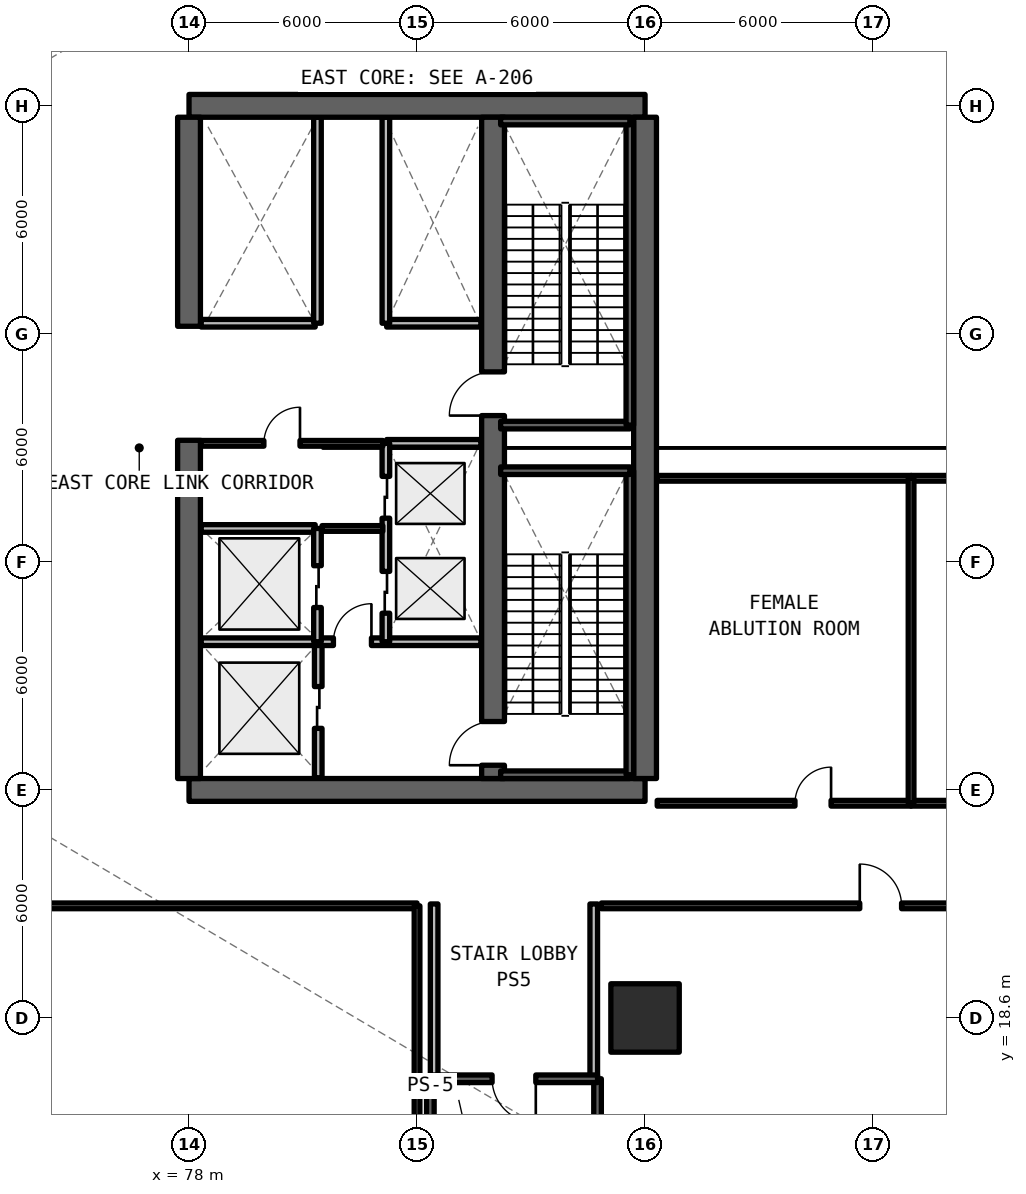
"""IFC4 building model, lengths in metres.
Left out: names, types, materials, properties, quantities, classifications, styles, units other than length and angle.
Written with IfcOpenShell. Run it as: python <this file> out.ifc"""

import sys

from ifc_helpers import new_model, si_unit, direction, frame, frame_2d, origin, origin_2d, place, context, subcontext, project, spatial, rectangle, extrude, element, fill, save


model = new_model("IFC4")
c1 = context("Model", 3, precision=1e-05, world=origin(), true_north=direction((0.0, 1.0)))
c2 = subcontext(c1, "Body", "Model", "MODEL_VIEW")
j1 = project(units=[si_unit("LENGTHUNIT", "METRE"), si_unit("PLANEANGLEUNIT", "RADIAN")], contexts=[c1])
p1 = place(None, origin())
s1 = spatial("IfcSite", under=j1, at=p1, CompositionType="ELEMENT")
p2 = place(p1, origin())
s2 = spatial("IfcBuilding", under=s1, at=p2, CompositionType="ELEMENT")
p3 = place(p2, frame((0.0, 0.0, 4.95)))
s3 = spatial("IfcBuildingStorey", under=s2, at=p3, CompositionType="ELEMENT", Elevation=4.95)
for number, where, z_axis, x_axis in (
    (1, (78.0, 24.6, 0.0), (0.0, 0.0, 1.0), (1.0, 0.0, 0.0)),
    (2, (90.0, 42.6, 0.0), (0.0, 0.0, 1.0), (-1.0, 0.0, 0.0)),
):
    element("IfcWall", number, at=place(p3, frame(where, z_axis=z_axis, x_axis=x_axis)), inside=s3, PredefinedType="SHEAR", context=c2, shape_type="SweptSolid", body=[
        extrude(rectangle(XDim=12.0, YDim=0.6, at=frame_2d((6.0, 0.0))), origin(), (0.0, 0.0, 1.0), 4.95),
    ])
p4 = place(p3, frame((90.0, 24.9, 0.0), z_axis=(0.0, 0.0, 1.0), x_axis=(0.0, 1.0, 0.0)))
e3 = element("IfcWall", 3, at=p4, inside=s3, PredefinedType="SHEAR", context=c2, shape_type="SweptSolid", body=[
    extrude(rectangle(XDim=17.4, YDim=0.6, at=frame_2d((8.7, 0.0))), origin(), (0.0, 0.0, 1.0), 4.95),
])
p5 = place(p3, frame((78.0, 24.9, 0.0), z_axis=(0.0, 0.0, 1.0), x_axis=(0.0, 1.0, 0.0)))
e4 = element("IfcWall", 4, at=p5, inside=s3, PredefinedType="SHEAR", context=c2, shape_type="SweptSolid", body=[
    extrude(rectangle(XDim=8.9, YDim=0.6, at=frame_2d((4.45, 0.0))), origin(), (0.0, 0.0, 1.0), 4.95),
])
p6 = place(p3, frame((78.0, 36.8, 0.0), z_axis=(0.0, 0.0, 1.0), x_axis=(0.0, 1.0, 0.0)))
e5 = element("IfcWall", 5, at=p6, inside=s3, PredefinedType="SHEAR", context=c2, shape_type="SweptSolid", body=[
    extrude(rectangle(XDim=5.5, YDim=0.6, at=frame_2d((2.75, 0.0))), origin(), (0.0, 0.0, 1.0), 4.95),
])
p7 = place(p3, frame((86.0, 24.9, 0.0), z_axis=(0.0, 0.0, 1.0), x_axis=(0.0, 1.0, 0.0)))
e6 = element("IfcWall", 6, at=p7, inside=s3, PredefinedType="SHEAR", context=c2, shape_type="SweptSolid", body=[
    extrude(rectangle(XDim=17.4, YDim=0.6, at=frame_2d((8.7, 0.0))), origin(), (0.0, 0.0, 1.0), 4.95),
])
p8 = place(p7, frame((0.35, 0.0, 0.0)))
e7 = element("IfcOpeningElement", 7, at=p8, cuts=e6, PredefinedType="OPENING", context=c2, shape_type="SweptSolid", body=[
    extrude(rectangle(XDim=1.15, YDim=2.15, at=frame_2d((0.575, 1.075))), frame((0.0, 0.31, 0.0), z_axis=(0.0, -1.0, 0.0), x_axis=(1.0, 0.0, 0.0)), (0.0, 0.0, 1.0), 0.62),
])
p9 = place(p7, frame((9.55, 0.0, 0.0)))
e8 = element("IfcOpeningElement", 8, at=p9, cuts=e6, PredefinedType="OPENING", context=c2, shape_type="SweptSolid", body=[
    extrude(rectangle(XDim=1.15, YDim=2.15, at=frame_2d((0.575, 1.075))), frame((0.0, 0.31, 0.0), z_axis=(0.0, -1.0, 0.0), x_axis=(1.0, 0.0, 0.0)), (0.0, 0.0, 1.0), 0.62),
])
p10 = place(p3, frame((90.0, 18.6, 0.0), z_axis=(0.0, 0.0, 1.0), x_axis=(1.0, 0.0, 0.0)))
e9 = element("IfcColumn", 9, at=p10, inside=s3, PredefinedType="COLUMN", context=c2, shape_type="SweptSolid", body=[
    extrude(rectangle(XDim=1.8, YDim=1.8, at=origin_2d()), origin(), (0.0, 0.0, 1.0), 4.95),
])
p11 = place(p3, frame((81.4, 24.92, 0.0), z_axis=(0.0, 0.0, 1.0), x_axis=(0.0, 1.0, 0.0)))
e10 = element("IfcWall", 10, at=p11, inside=s3, PredefinedType="SOLIDWALL", context=c2, shape_type="SweptSolid", body=[
    extrude(rectangle(XDim=3.58, YDim=0.2, at=frame_2d((1.79, 0.0))), origin(), (0.0, 0.0, 1.0), 3.89),
])
p12 = place(p11, frame((1.3, 0.0, 0.0)))
e11 = element("IfcOpeningElement", 11, at=p12, cuts=e10, PredefinedType="OPENING", context=c2, shape_type="SweptSolid", body=[
    extrude(rectangle(XDim=1.1, YDim=2.2, at=frame_2d((0.55, 1.1))), frame((0.0, 0.11, 0.0), z_axis=(0.0, -1.0, 0.0), x_axis=(1.0, 0.0, 0.0)), (0.0, 0.0, 1.0), 0.22),
])
p13 = place(p3, frame((78.32, 28.5, 0.0), z_axis=(0.0, 0.0, 1.0), x_axis=(1.0, 0.0, 0.0)))
e12 = element("IfcWall", 12, at=p13, inside=s3, PredefinedType="SOLIDWALL", context=c2, shape_type="SweptSolid", body=[
    extrude(rectangle(XDim=7.36, YDim=0.2, at=frame_2d((3.68, 0.0))), origin(), (0.0, 0.0, 1.0), 3.89),
])
p14 = place(p13, frame((3.48, 0.0, 0.0)))
e13 = element("IfcOpeningElement", 13, at=p14, cuts=e12, PredefinedType="OPENING", context=c2, shape_type="SweptSolid", body=[
    extrude(rectangle(XDim=1.0, YDim=2.15, at=frame_2d((0.5, 1.075))), frame((0.0, 0.11, 0.0), z_axis=(0.0, -1.0, 0.0), x_axis=(1.0, 0.0, 0.0)), (0.0, 0.0, 1.0), 0.22),
])
p15 = place(p3, frame((83.2, 33.72, 0.0), z_axis=(0.0, 0.0, 1.0), x_axis=(1.0, 0.0, 0.0)))
e14 = element("IfcWall", 14, at=p15, inside=s3, PredefinedType="SOLIDWALL", context=c2, shape_type="SweptSolid", body=[
    extrude(rectangle(XDim=2.48, YDim=0.2, at=frame_2d((1.24, 0.0))), origin(), (0.0, 0.0, 1.0), 3.89),
])
p16 = place(p3, frame((83.18, 28.5, 0.0), z_axis=(0.0, 0.0, 1.0), x_axis=(0.0, 1.0, 0.0)))
e15 = element("IfcWall", 15, at=p16, inside=s3, PredefinedType="SOLIDWALL", context=c2, shape_type="SweptSolid", body=[
    extrude(rectangle(XDim=5.22, YDim=0.2, at=frame_2d((2.61, 0.0))), origin(), (0.0, 0.0, 1.0), 3.89),
])
p17 = place(p16, frame((0.75, 0.0, 0.0)))
e16 = element("IfcOpeningElement", 16, at=p17, cuts=e15, PredefinedType="OPENING", context=c2, shape_type="SweptSolid", body=[
    extrude(rectangle(XDim=1.1, YDim=2.2, at=frame_2d((0.55, 1.1))), frame((0.0, 0.11, 0.0), z_axis=(0.0, -1.0, 0.0), x_axis=(1.0, 0.0, 0.0)), (0.0, 0.0, 1.0), 0.22),
])
p18 = place(p16, frame((3.25, 0.0, 0.0)))
e17 = element("IfcOpeningElement", 17, at=p18, cuts=e15, PredefinedType="OPENING", context=c2, shape_type="SweptSolid", body=[
    extrude(rectangle(XDim=1.1, YDim=2.2, at=frame_2d((0.55, 1.1))), frame((0.0, 0.11, 0.0), z_axis=(0.0, -1.0, 0.0), x_axis=(1.0, 0.0, 0.0)), (0.0, 0.0, 1.0), 0.22),
])
p19 = place(p3, frame((78.32, 31.48, 0.0), z_axis=(0.0, 0.0, 1.0), x_axis=(1.0, 0.0, 0.0)))
e18 = element("IfcWall", 18, at=p19, inside=s3, PredefinedType="SOLIDWALL", context=c2, shape_type="SweptSolid", body=[
    extrude(rectangle(XDim=3.0, YDim=0.2, at=frame_2d((1.5, 0.0))), origin(), (0.0, 0.0, 1.0), 3.89),
])
p20 = place(p3, frame((81.38, 28.5, 0.0), z_axis=(0.0, 0.0, 1.0), x_axis=(0.0, 1.0, 0.0)))
e19 = element("IfcWall", 19, at=p20, inside=s3, PredefinedType="SOLIDWALL", context=c2, shape_type="SweptSolid", body=[
    extrude(rectangle(XDim=2.98, YDim=0.2, at=frame_2d((1.49, 0.0))), origin(), (0.0, 0.0, 1.0), 3.89),
])
p21 = place(p20, frame((0.9, 0.0, 0.0)))
e20 = element("IfcOpeningElement", 20, at=p21, cuts=e19, PredefinedType="OPENING", context=c2, shape_type="SweptSolid", body=[
    extrude(rectangle(XDim=1.1, YDim=2.2, at=frame_2d((0.55, 1.1))), frame((0.0, 0.11, 0.0), z_axis=(0.0, -1.0, 0.0), x_axis=(1.0, 0.0, 0.0)), (0.0, 0.0, 1.0), 0.22),
])
p22 = place(p3, frame((81.5, 31.48, 0.0), z_axis=(0.0, 0.0, 1.0), x_axis=(1.0, 0.0, 0.0)))
e21 = element("IfcWall", 21, at=p22, inside=s3, PredefinedType="SOLIDWALL", context=c2, shape_type="SweptSolid", body=[
    extrude(rectangle(XDim=1.6, YDim=0.15, at=frame_2d((0.8, 0.0))), origin(), (0.0, 0.0, 1.0), 3.89),
])
p23 = place(p3, frame((78.32, 33.72, 0.0), z_axis=(0.0, 0.0, 1.0), x_axis=(1.0, 0.0, 0.0)))
e22 = element("IfcWall", 22, at=p23, inside=s3, PredefinedType="SOLIDWALL", context=c2, shape_type="SweptSolid", body=[
    extrude(rectangle(XDim=4.78, YDim=0.15, at=frame_2d((2.39, 0.0))), origin(), (0.0, 0.0, 1.0), 3.89),
])
p24 = place(p23, frame((1.65, 0.0, 0.0)))
e23 = element("IfcOpeningElement", 23, at=p24, cuts=e22, PredefinedType="OPENING", context=c2, shape_type="SweptSolid", body=[
    extrude(rectangle(XDim=0.95, YDim=2.15, at=frame_2d((0.475, 1.075))), frame((0.0, 0.085, 0.0), z_axis=(0.0, -1.0, 0.0), x_axis=(1.0, 0.0, 0.0)), (0.0, 0.0, 1.0), 0.17),
])
p25 = place(p3, frame((83.2, 36.88, 0.0), z_axis=(0.0, 0.0, 1.0), x_axis=(1.0, 0.0, 0.0)))
e24 = element("IfcWall", 24, at=p25, inside=s3, PredefinedType="SOLIDWALL", context=c2, shape_type="SweptSolid", body=[
    extrude(rectangle(XDim=2.48, YDim=0.2, at=frame_2d((1.24, 0.0))), origin(), (0.0, 0.0, 1.0), 3.89),
])
p26 = place(p3, frame((83.18, 36.88, 0.0), z_axis=(0.0, 0.0, 1.0), x_axis=(0.0, 1.0, 0.0)))
e25 = element("IfcWall", 25, at=p26, inside=s3, PredefinedType="SOLIDWALL", context=c2, shape_type="SweptSolid", body=[
    extrude(rectangle(XDim=5.42, YDim=0.2, at=frame_2d((2.71, 0.0))), origin(), (0.0, 0.0, 1.0), 3.89),
])
p27 = place(p3, frame((78.32, 36.88, 0.0), z_axis=(0.0, 0.0, 1.0), x_axis=(1.0, 0.0, 0.0)))
e26 = element("IfcWall", 26, at=p27, inside=s3, PredefinedType="SOLIDWALL", context=c2, shape_type="SweptSolid", body=[
    extrude(rectangle(XDim=3.0, YDim=0.2, at=frame_2d((1.5, 0.0))), origin(), (0.0, 0.0, 1.0), 3.89),
])
p28 = place(p3, frame((81.38, 36.88, 0.0), z_axis=(0.0, 0.0, 1.0), x_axis=(0.0, 1.0, 0.0)))
e27 = element("IfcWall", 27, at=p28, inside=s3, PredefinedType="SOLIDWALL", context=c2, shape_type="SweptSolid", body=[
    extrude(rectangle(XDim=5.42, YDim=0.2, at=frame_2d((2.71, 0.0))), origin(), (0.0, 0.0, 1.0), 3.89),
])
for number, where, z_axis, x_axis in (
    (28, (84.45, 17.0, 0.0), (0.0, 0.0, 1.0), (0.0, 1.0, 0.0)),
    (29, (88.65, 17.0, 0.0), (0.0, 0.0, 1.0), (0.0, 1.0, 0.0)),
):
    element("IfcWall", number, at=place(p3, frame(where, z_axis=z_axis, x_axis=x_axis)), inside=s3, PredefinedType="SOLIDWALL", context=c2, shape_type="SweptSolid", body=[
        extrude(rectangle(XDim=4.6, YDim=0.2, at=frame_2d((2.3, 0.0))), origin(), (0.0, 0.0, 1.0), 3.89),
    ])
p29 = place(p3, frame((48.75, 21.55, 0.0), z_axis=(0.0, 0.0, 1.0), x_axis=(1.0, 0.0, 0.0)))
e30 = element("IfcWall", 30, at=p29, inside=s3, PredefinedType="SOLIDWALL", context=c2, shape_type="SweptSolid", body=[
    extrude(rectangle(XDim=35.25, YDim=0.15, at=frame_2d((17.625, 0.0))), origin(), (0.0, 0.0, 1.0), 3.89),
])
p30 = place(p29, frame((17.3, 0.0, 0.0)))
e31 = element("IfcOpeningElement", 31, at=p30, cuts=e30, PredefinedType="OPENING", context=c2, shape_type="SweptSolid", body=[
    extrude(rectangle(XDim=1.4, YDim=2.15, at=frame_2d((0.7, 1.075))), frame((0.0, 0.085, 0.0), z_axis=(0.0, -1.0, 0.0), x_axis=(1.0, 0.0, 0.0)), (0.0, 0.0, 1.0), 0.17),
])
p31 = place(p3, frame((84.0, 1.3, 0.0), z_axis=(0.0, 0.0, 1.0), x_axis=(0.0, 1.0, 0.0)))
e32 = element("IfcWall", 32, at=p31, inside=s3, PredefinedType="SOLIDWALL", context=c2, shape_type="SweptSolid", body=[
    extrude(rectangle(XDim=20.25, YDim=0.15, at=frame_2d((10.125, 0.0))), origin(), (0.0, 0.0, 1.0), 3.89),
])
p32 = place(p3, frame((90.32, 24.25, 0.0), z_axis=(0.0, 0.0, 1.0), x_axis=(1.0, 0.0, 0.0)))
e33 = element("IfcWall", 33, at=p32, inside=s3, PredefinedType="SOLIDWALL", context=c2, shape_type="SweptSolid", body=[
    extrude(rectangle(XDim=6.68, YDim=0.15, at=frame_2d((3.34, 0.0))), origin(), (0.0, 0.0, 1.0), 3.89),
])
p33 = place(p32, frame((3.625, 0.0, 0.0)))
e34 = element("IfcOpeningElement", 34, at=p33, cuts=e33, PredefinedType="OPENING", context=c2, shape_type="SweptSolid", body=[
    extrude(rectangle(XDim=0.95, YDim=2.15, at=frame_2d((0.475, 1.075))), frame((0.0, 0.085, 0.0), z_axis=(0.0, -1.0, 0.0), x_axis=(1.0, 0.0, 0.0)), (0.0, 0.0, 1.0), 0.17),
])
p34 = place(p3, frame((90.32, 32.8, 0.0), z_axis=(0.0, 0.0, 1.0), x_axis=(1.0, 0.0, 0.0)))
e35 = element("IfcWall", 35, at=p34, inside=s3, PredefinedType="SOLIDWALL", context=c2, shape_type="SweptSolid", body=[
    extrude(rectangle(XDim=6.68, YDim=0.15, at=frame_2d((3.34, 0.0))), origin(), (0.0, 0.0, 1.0), 3.89),
])
p35 = place(p3, frame((97.0, 24.25, 0.0), z_axis=(0.0, 0.0, 1.0), x_axis=(1.0, 0.0, 0.0)))
e36 = element("IfcWall", 36, at=p35, inside=s3, PredefinedType="SOLIDWALL", context=c2, shape_type="SweptSolid", body=[
    extrude(rectangle(XDim=7.0, YDim=0.15, at=frame_2d((3.5, 0.0))), origin(), (0.0, 0.0, 1.0), 3.89),
])
p36 = place(p35, frame((1.325, 0.0, 0.0)))
e37 = element("IfcOpeningElement", 37, at=p36, cuts=e36, PredefinedType="OPENING", context=c2, shape_type="SweptSolid", body=[
    extrude(rectangle(XDim=0.95, YDim=2.15, at=frame_2d((0.475, 1.075))), frame((0.0, 0.085, 0.0), z_axis=(0.0, -1.0, 0.0), x_axis=(1.0, 0.0, 0.0)), (0.0, 0.0, 1.0), 0.17),
])
p37 = place(p3, frame((97.0, 32.8, 0.0), z_axis=(0.0, 0.0, 1.0), x_axis=(1.0, 0.0, 0.0)))
e38 = element("IfcWall", 38, at=p37, inside=s3, PredefinedType="SOLIDWALL", context=c2, shape_type="SweptSolid", body=[
    extrude(rectangle(XDim=7.0, YDim=0.15, at=frame_2d((3.5, 0.0))), origin(), (0.0, 0.0, 1.0), 3.89),
])
p38 = place(p3, frame((97.0, 24.25, 0.0), z_axis=(0.0, 0.0, 1.0), x_axis=(0.0, 1.0, 0.0)))
e39 = element("IfcWall", 39, at=p38, inside=s3, PredefinedType="SOLIDWALL", context=c2, shape_type="SweptSolid", body=[
    extrude(rectangle(XDim=8.55, YDim=0.15, at=frame_2d((4.275, 0.0))), origin(), (0.0, 0.0, 1.0), 3.89),
])
p39 = place(p3, frame((88.85, 21.55, 0.0), z_axis=(0.0, 0.0, 1.0), x_axis=(1.0, 0.0, 0.0)))
e40 = element("IfcWall", 40, at=p39, inside=s3, PredefinedType="SOLIDWALL", context=c2, shape_type="SweptSolid", body=[
    extrude(rectangle(XDim=14.7, YDim=0.15, at=frame_2d((7.35, 0.0))), origin(), (0.0, 0.0, 1.0), 3.89),
])
p40 = place(p39, frame((6.8, 0.0, 0.0)))
e41 = element("IfcOpeningElement", 41, at=p40, cuts=e40, PredefinedType="OPENING", context=c2, shape_type="SweptSolid", body=[
    extrude(rectangle(XDim=1.1, YDim=2.15, at=frame_2d((0.55, 1.075))), frame((0.0, 0.085, 0.0), z_axis=(0.0, -1.0, 0.0), x_axis=(1.0, 0.0, 0.0)), (0.0, 0.0, 1.0), 0.17),
])
p41 = place(p3, frame((86.2, 25.0, 0.0), z_axis=(0.0, 0.0, 1.0), x_axis=(1.0, 0.0, 0.0)))
e42 = element("IfcWall", 42, at=p41, inside=s3, PredefinedType="SOLIDWALL", context=c2, shape_type="SweptSolid", body=[
    extrude(rectangle(XDim=3.4, YDim=0.2, at=frame_2d((1.7, 0.0))), origin(), (0.0, 0.0, 1.0), 4.95),
])
p42 = place(p3, frame((89.6, 25.0, 0.0), z_axis=(0.0, 0.0, 1.0), x_axis=(0.0, 1.0, 0.0)))
e43 = element("IfcWall", 43, at=p42, inside=s3, PredefinedType="SOLIDWALL", context=c2, shape_type="SweptSolid", body=[
    extrude(rectangle(XDim=8.0, YDim=0.2, at=frame_2d((4.0, 0.0))), origin(), (0.0, 0.0, 1.0), 4.95),
])
for number, where, z_axis, x_axis in (
    (44, (89.6, 33.0, 0.0), (0.0, 0.0, 1.0), (-1.0, 0.0, 0.0)),
    (45, (86.2, 34.2, 0.0), (0.0, 0.0, 1.0), (1.0, 0.0, 0.0)),
):
    element("IfcWall", number, at=place(p3, frame(where, z_axis=z_axis, x_axis=x_axis)), inside=s3, PredefinedType="SOLIDWALL", context=c2, shape_type="SweptSolid", body=[
        extrude(rectangle(XDim=3.4, YDim=0.2, at=frame_2d((1.7, 0.0))), origin(), (0.0, 0.0, 1.0), 4.95),
    ])
p43 = place(p3, frame((89.6, 34.2, 0.0), z_axis=(0.0, 0.0, 1.0), x_axis=(0.0, 1.0, 0.0)))
e46 = element("IfcWall", 46, at=p43, inside=s3, PredefinedType="SOLIDWALL", context=c2, shape_type="SweptSolid", body=[
    extrude(rectangle(XDim=8.0, YDim=0.2, at=frame_2d((4.0, 0.0))), origin(), (0.0, 0.0, 1.0), 4.95),
])
p44 = place(p3, frame((89.6, 42.2, 0.0), z_axis=(0.0, 0.0, 1.0), x_axis=(-1.0, 0.0, 0.0)))
e47 = element("IfcWall", 47, at=p44, inside=s3, PredefinedType="SOLIDWALL", context=c2, shape_type="SweptSolid", body=[
    extrude(rectangle(XDim=3.4, YDim=0.2, at=frame_2d((1.7, 0.0))), origin(), (0.0, 0.0, 1.0), 4.95),
])
p45 = place(p3, frame((88.75, 8.4, 0.0), z_axis=(0.0, 0.0, 1.0), x_axis=(0.0, 1.0, 0.0)))
e48 = element("IfcWall", 48, at=p45, inside=s3, PredefinedType="SOLIDWALL", context=c2, shape_type="SweptSolid", body=[
    extrude(rectangle(XDim=8.6, YDim=0.2, at=frame_2d((4.3, 0.0))), origin(), (0.0, 0.0, 1.0), 4.95),
])
p46 = place(p3, frame((88.75, 17.0, 0.0), z_axis=(0.0, 0.0, 1.0), x_axis=(-1.0, 0.0, 0.0)))
e49 = element("IfcWall", 49, at=p46, inside=s3, PredefinedType="SOLIDWALL", context=c2, shape_type="SweptSolid", body=[
    extrude(rectangle(XDim=4.4, YDim=0.2, at=frame_2d((2.2, 0.0))), origin(), (0.0, 0.0, 1.0), 4.95),
])
p47 = place(p46, frame((1.625, 0.0, 0.0)))
e50 = element("IfcOpeningElement", 50, at=p47, cuts=e49, PredefinedType="OPENING", context=c2, shape_type="SweptSolid", body=[
    extrude(rectangle(XDim=1.15, YDim=2.15, at=frame_2d((0.575, 1.075))), frame((0.0, 0.11, 0.0), z_axis=(0.0, -1.0, 0.0), x_axis=(1.0, 0.0, 0.0)), (0.0, 0.0, 1.0), 0.22),
])
p48 = place(p3, frame((84.35, 17.0, 0.0), z_axis=(0.0, 0.0, 1.0), x_axis=(0.0, -1.0, 0.0)))
e51 = element("IfcWall", 51, at=p48, inside=s3, PredefinedType="SOLIDWALL", context=c2, shape_type="SweptSolid", body=[
    extrude(rectangle(XDim=8.6, YDim=0.2, at=frame_2d((4.3, 0.0))), origin(), (0.0, 0.0, 1.0), 4.95),
])
p49 = place(p12, origin())
e52 = element("IfcDoor", 52, at=p49, inside=s3, OperationType="SLIDING_TO_LEFT", PredefinedType="DOOR", context=c2, shape_type="SweptSolid", body=[
    extrude(rectangle(XDim=1.1, YDim=2.2, at=frame_2d((0.55, 1.1))), frame((0.0, 0.025, 0.0), z_axis=(0.0, -1.0, 0.0), x_axis=(1.0, 0.0, 0.0)), (0.0, 0.0, 1.0), 0.05),
])
fill(e11, e52)
p50 = place(p14, origin())
e53 = element("IfcDoor", 53, at=p50, inside=s3, OperationType="SINGLE_SWING_RIGHT", PredefinedType="DOOR", context=c2, shape_type="SweptSolid", body=[
    extrude(rectangle(XDim=1.0, YDim=2.15, at=frame_2d((0.5, 1.075))), frame((0.0, 0.025, 0.0), z_axis=(0.0, -1.0, 0.0), x_axis=(1.0, 0.0, 0.0)), (0.0, 0.0, 1.0), 0.05),
])
fill(e13, e53)
p51 = place(p17, origin())
e54 = element("IfcDoor", 54, at=p51, inside=s3, OperationType="SLIDING_TO_LEFT", PredefinedType="DOOR", context=c2, shape_type="SweptSolid", body=[
    extrude(rectangle(XDim=1.1, YDim=2.2, at=frame_2d((0.55, 1.1))), frame((0.0, 0.025, 0.0), z_axis=(0.0, -1.0, 0.0), x_axis=(1.0, 0.0, 0.0)), (0.0, 0.0, 1.0), 0.05),
])
fill(e16, e54)
p52 = place(p18, origin())
e55 = element("IfcDoor", 55, at=p52, inside=s3, OperationType="SLIDING_TO_RIGHT", PredefinedType="DOOR", context=c2, shape_type="SweptSolid", body=[
    extrude(rectangle(XDim=1.1, YDim=2.2, at=frame_2d((0.55, 1.1))), frame((0.0, 0.025, 0.0), z_axis=(0.0, -1.0, 0.0), x_axis=(1.0, 0.0, 0.0)), (0.0, 0.0, 1.0), 0.05),
])
fill(e17, e55)
p53 = place(p21, origin())
e56 = element("IfcDoor", 56, at=p53, inside=s3, OperationType="SLIDING_TO_LEFT", PredefinedType="DOOR", context=c2, shape_type="SweptSolid", body=[
    extrude(rectangle(XDim=1.1, YDim=2.2, at=frame_2d((0.55, 1.1))), frame((0.0, 0.025, 0.0), z_axis=(0.0, -1.0, 0.0), x_axis=(1.0, 0.0, 0.0)), (0.0, 0.0, 1.0), 0.05),
])
fill(e20, e56)
p54 = place(p24, origin())
e57 = element("IfcDoor", 57, at=p54, inside=s3, OperationType="SINGLE_SWING_RIGHT", PredefinedType="DOOR", context=c2, shape_type="SweptSolid", body=[
    extrude(rectangle(XDim=0.95, YDim=2.15, at=frame_2d((0.475, 1.075))), frame((0.0, 0.025, 0.0), z_axis=(0.0, -1.0, 0.0), x_axis=(1.0, 0.0, 0.0)), (0.0, 0.0, 1.0), 0.05),
])
fill(e23, e57)
p55 = place(p33, origin())
e58 = element("IfcDoor", 58, at=p55, inside=s3, OperationType="SINGLE_SWING_RIGHT", PredefinedType="DOOR", context=c2, shape_type="SweptSolid", body=[
    extrude(rectangle(XDim=0.95, YDim=2.15, at=frame_2d((0.475, 1.075))), frame((0.0, 0.025, 0.0), z_axis=(0.0, -1.0, 0.0), x_axis=(1.0, 0.0, 0.0)), (0.0, 0.0, 1.0), 0.05),
])
fill(e34, e58)
p56 = place(p40, origin())
e59 = element("IfcDoor", 59, at=p56, inside=s3, OperationType="SINGLE_SWING_LEFT", PredefinedType="DOOR", context=c2, shape_type="SweptSolid", body=[
    extrude(rectangle(XDim=1.1, YDim=2.15, at=frame_2d((0.55, 1.075))), frame((0.0, 0.025, 0.0), z_axis=(0.0, -1.0, 0.0), x_axis=(1.0, 0.0, 0.0)), (0.0, 0.0, 1.0), 0.05),
])
fill(e41, e59)
p57 = place(p8, origin())
e60 = element("IfcDoor", 60, at=p57, inside=s3, OperationType="SINGLE_SWING_RIGHT", PredefinedType="DOOR", context=c2, shape_type="SweptSolid", body=[
    extrude(rectangle(XDim=1.15, YDim=2.15, at=frame_2d((0.575, 1.075))), frame((0.0, 0.025, 0.0), z_axis=(0.0, -1.0, 0.0), x_axis=(1.0, 0.0, 0.0)), (0.0, 0.0, 1.0), 0.05),
])
fill(e7, e60)
p58 = place(p9, origin())
e61 = element("IfcDoor", 61, at=p58, inside=s3, OperationType="SINGLE_SWING_LEFT", PredefinedType="DOOR", context=c2, shape_type="SweptSolid", body=[
    extrude(rectangle(XDim=1.15, YDim=2.15, at=frame_2d((0.575, 1.075))), frame((0.0, 0.025, 0.0), z_axis=(0.0, -1.0, 0.0), x_axis=(1.0, 0.0, 0.0)), (0.0, 0.0, 1.0), 0.05),
])
fill(e8, e61)
p59 = place(p47, origin())
e62 = element("IfcDoor", 62, at=p59, inside=s3, OperationType="SINGLE_SWING_RIGHT", PredefinedType="DOOR", context=c2, shape_type="SweptSolid", body=[
    extrude(rectangle(XDim=1.15, YDim=2.15, at=frame_2d((0.575, 1.075))), frame((0.0, 0.025, 0.0), z_axis=(0.0, -1.0, 0.0), x_axis=(1.0, 0.0, 0.0)), (0.0, 0.0, 1.0), 0.05),
])
fill(e50, e62)
save(model, sys.argv[1])
